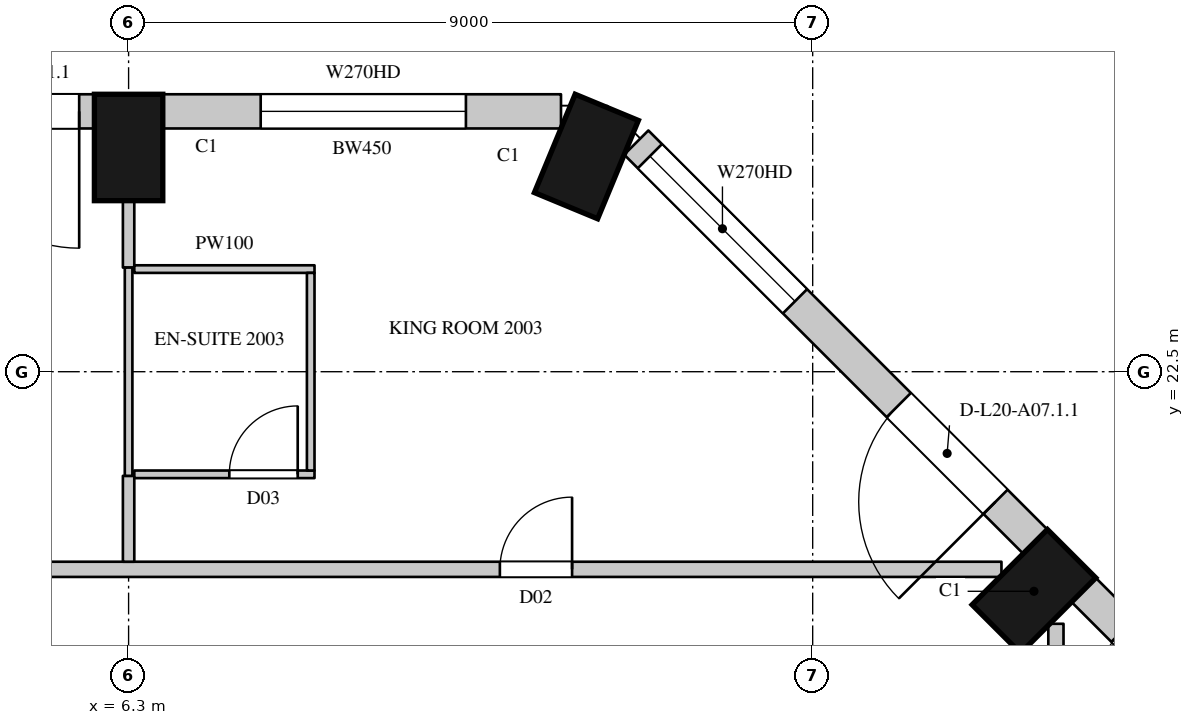
"""IFC4 building model, lengths in metres.
Left out: names, types, materials, properties, quantities, classifications, styles, units other than length and angle.
Written with IfcOpenShell. Run it as: python <this file> out.ifc"""

import sys

from ifc_helpers import new_model, si_unit, direction, frame, frame_2d, origin, origin_2d, place, context, subcontext, project, spatial, rectangle, extrude, element, fill, save


model = new_model("IFC4")
c1 = context("Model", 3, precision=1e-05, world=origin(), true_north=direction((0.0, 1.0)))
c2 = subcontext(c1, "Body", "Model", "MODEL_VIEW")
j1 = project(units=[si_unit("LENGTHUNIT", "METRE"), si_unit("PLANEANGLEUNIT", "RADIAN")], contexts=[c1])
p1 = place(None, origin())
s1 = spatial("IfcSite", under=j1, at=p1, CompositionType="ELEMENT")
p2 = place(p1, origin())
s2 = spatial("IfcBuilding", under=s1, at=p2, CompositionType="ELEMENT")
p3 = place(p2, frame((0.0, 0.0, 102.3)))
s3 = spatial("IfcBuildingStorey", under=s2, at=p3, CompositionType="ELEMENT", Elevation=102.3)
for number, where, z_axis, x_axis in (
    (1, (18.211, 19.611, 0.0), (0.0, 0.0, 1.0), (-0.707, 0.707, 0.0)),
    (2, (12.323, 25.331, 0.0), (0.0, 0.0, 1.0), (-0.924, 0.383, 0.0)),
    (3, (6.3, 25.45, 0.0), (0.0, 0.0, 1.0), (-1.0, 0.0, 0.0)),
):
    element("IfcColumn", number, at=place(p3, frame(where, z_axis=z_axis, x_axis=x_axis)), inside=s3, PredefinedType="COLUMN", context=c2, shape_type="SweptSolid", body=[
        extrude(rectangle(XDim=0.9, YDim=1.4, at=origin_2d()), origin(), (0.0, 0.0, 1.0), 3.6),
    ])
p4 = place(p3, frame((24.115, 14.379, 0.0), z_axis=(0.0, 0.0, 1.0), x_axis=(-0.707106781187, 0.707106781187, 0.0)))
e4 = element("IfcWall", 4, at=p4, inside=s3, PredefinedType="SOLIDWALL", context=c2, shape_type="SweptSolid", body=[
    extrude(rectangle(XDim=7.424, YDim=0.45, at=frame_2d((3.712, 0.0))), origin(), (0.0, 0.0, 1.0), 3.3),
])
p5 = place(p4, frame((0.253, 0.0, 1.05)))
e5 = element("IfcOpeningElement", 5, at=p5, cuts=e4, PredefinedType="OPENING", context=c2, shape_type="SweptSolid", body=[
    extrude(rectangle(XDim=2.7, YDim=2.0, at=frame_2d((1.35, 1.0))), frame((0.0, 0.235, 0.0), z_axis=(0.0, -1.0, 0.0), x_axis=(1.0, 0.0, 0.0)), (0.0, 0.0, 1.0), 0.47),
])
p6 = place(p4, frame((4.884, 0.0, 0.0)))
e6 = element("IfcOpeningElement", 6, at=p6, cuts=e4, PredefinedType="OPENING", context=c2, shape_type="SweptSolid", body=[
    extrude(rectangle(XDim=1.8, YDim=2.4, at=frame_2d((0.9, 1.2))), frame((0.0, 0.235, 0.0), z_axis=(0.0, -1.0, 0.0), x_axis=(1.0, 0.0, 0.0)), (0.0, 0.0, 1.0), 0.47),
])
p7 = place(p3, frame((18.229, 20.265, 0.0), z_axis=(0.0, 0.0, 1.0), x_axis=(-0.707106781187, 0.707106781187, 0.0)))
e7 = element("IfcWall", 7, at=p7, inside=s3, PredefinedType="SOLIDWALL", context=c2, shape_type="SweptSolid", body=[
    extrude(rectangle(XDim=7.424, YDim=0.45, at=frame_2d((3.712, 0.0))), origin(), (0.0, 0.0, 1.0), 3.3),
])
p8 = place(p7, frame((0.74, 0.0, 0.0)))
e8 = element("IfcOpeningElement", 8, at=p8, cuts=e7, PredefinedType="OPENING", context=c2, shape_type="SweptSolid", body=[
    extrude(rectangle(XDim=1.8, YDim=2.4, at=frame_2d((0.9, 1.2))), frame((0.0, 0.235, 0.0), z_axis=(0.0, -1.0, 0.0), x_axis=(1.0, 0.0, 0.0)), (0.0, 0.0, 1.0), 0.47),
])
p9 = place(p7, frame((4.471, 0.0, 1.05)))
e9 = element("IfcOpeningElement", 9, at=p9, cuts=e7, PredefinedType="OPENING", context=c2, shape_type="SweptSolid", body=[
    extrude(rectangle(XDim=2.7, YDim=2.0, at=frame_2d((1.35, 1.0))), frame((0.0, 0.235, 0.0), z_axis=(0.0, -1.0, 0.0), x_axis=(1.0, 0.0, 0.0)), (0.0, 0.0, 1.0), 0.47),
])
p10 = place(p3, frame((11.989, 25.925, 0.0), z_axis=(0.0, 0.0, 1.0), x_axis=(-1.0, 0.0, 0.0)))
e10 = element("IfcWall", 10, at=p10, inside=s3, PredefinedType="SOLIDWALL", context=c2, shape_type="SweptSolid", body=[
    extrude(rectangle(XDim=5.239, YDim=0.45, at=frame_2d((2.619, 0.0))), origin(), (0.0, 0.0, 1.0), 3.3),
])
p11 = place(p10, frame((1.251, 0.0, 1.05)))
e11 = element("IfcOpeningElement", 11, at=p11, cuts=e10, PredefinedType="OPENING", context=c2, shape_type="SweptSolid", body=[
    extrude(rectangle(XDim=2.7, YDim=2.0, at=frame_2d((1.35, 1.0))), frame((0.0, 0.235, 0.0), z_axis=(0.0, -1.0, 0.0), x_axis=(1.0, 0.0, 0.0)), (0.0, 0.0, 1.0), 0.47),
])
p12 = place(p3, frame((5.85, 25.925, 0.0), z_axis=(0.0, 0.0, 1.0), x_axis=(-1.0, 0.0, 0.0)))
e12 = element("IfcWall", 12, at=p12, inside=s3, PredefinedType="SOLIDWALL", context=c2, shape_type="SweptSolid", body=[
    extrude(rectangle(XDim=8.1, YDim=0.45, at=frame_2d((4.05, 0.0))), origin(), (0.0, 0.0, 1.0), 3.3),
])
p13 = place(p12, frame((0.2, 0.0, 0.0)))
e13 = element("IfcOpeningElement", 13, at=p13, cuts=e12, PredefinedType="OPENING", context=c2, shape_type="SweptSolid", body=[
    extrude(rectangle(XDim=1.8, YDim=2.4, at=frame_2d((0.9, 1.2))), frame((0.0, 0.235, 0.0), z_axis=(0.0, -1.0, 0.0), x_axis=(1.0, 0.0, 0.0)), (0.0, 0.0, 1.0), 0.47),
])
p14 = place(p12, frame((2.2, 0.0, 1.05)))
e14 = element("IfcOpeningElement", 14, at=p14, cuts=e12, PredefinedType="OPENING", context=c2, shape_type="SweptSolid", body=[
    extrude(rectangle(XDim=1.2, YDim=2.0, at=frame_2d((0.6, 1.0))), frame((0.0, 0.235, 0.0), z_axis=(0.0, -1.0, 0.0), x_axis=(1.0, 0.0, 0.0)), (0.0, 0.0, 1.0), 0.47),
])
p15 = place(p12, frame((4.7, 0.0, 0.0)))
e15 = element("IfcOpeningElement", 15, at=p15, cuts=e12, PredefinedType="OPENING", context=c2, shape_type="SweptSolid", body=[
    extrude(rectangle(XDim=1.8, YDim=2.4, at=frame_2d((0.9, 1.2))), frame((0.0, 0.235, 0.0), z_axis=(0.0, -1.0, 0.0), x_axis=(1.0, 0.0, 0.0)), (0.0, 0.0, 1.0), 0.47),
])
p16 = place(p12, frame((6.7, 0.0, 1.05)))
e16 = element("IfcOpeningElement", 16, at=p16, cuts=e12, PredefinedType="OPENING", context=c2, shape_type="SweptSolid", body=[
    extrude(rectangle(XDim=1.2, YDim=2.0, at=frame_2d((0.6, 1.0))), frame((0.0, 0.235, 0.0), z_axis=(0.0, -1.0, 0.0), x_axis=(1.0, 0.0, 0.0)), (0.0, 0.0, 1.0), 0.47),
])
p17 = place(p3, frame((19.937, 20.078, 0.0), z_axis=(0.0, 0.0, 1.0), x_axis=(-0.707106781187, 0.707106781187, 0.0)))
e17 = element("IfcWall", 17, at=p17, inside=s3, PredefinedType="SOLIDWALL", context=c2, shape_type="SweptSolid", body=[
    extrude(rectangle(XDim=1.781, YDim=0.45, at=frame_2d((0.89, 0.0))), origin(), (0.0, 0.0, 1.0), 0.6),
])
p18 = place(p3, frame((16.486, 23.529, 0.0), z_axis=(0.0, 0.0, 1.0), x_axis=(-0.707022305137, 0.707191247145, 0.0)))
e18 = element("IfcWall", 18, at=p18, inside=s3, PredefinedType="SOLIDWALL", context=c2, shape_type="SweptSolid", body=[
    extrude(rectangle(XDim=1.445, YDim=0.45, at=frame_2d((0.723, 0.0))), origin(), (0.0, 0.0, 1.0), 0.6),
])
p19 = place(p3, frame((-23.765, 19.9, 0.0), z_axis=(0.0, 0.0, 1.0), x_axis=(1.0, 0.0, 0.0)))
e19 = element("IfcWall", 19, at=p19, inside=s3, PredefinedType="PARTITIONING", context=c2, shape_type="SweptSolid", body=[
    extrude(rectangle(XDim=41.549, YDim=0.2, at=frame_2d((20.774, 0.0))), origin(), (0.0, 0.0, 1.0), 3.3),
])
p20 = place(p19, frame((14.2, 0.0, 0.0)))
e20 = element("IfcOpeningElement", 20, at=p20, cuts=e19, PredefinedType="OPENING", context=c2, shape_type="SweptSolid", body=[
    extrude(rectangle(XDim=0.9, YDim=2.2, at=frame_2d((0.45, 1.1))), frame((0.0, 0.11, 0.0), z_axis=(0.0, -1.0, 0.0), x_axis=(1.0, 0.0, 0.0)), (0.0, 0.0, 1.0), 0.22),
])
p21 = place(p19, frame((27.05, 0.0, 0.0)))
e21 = element("IfcOpeningElement", 21, at=p21, cuts=e19, PredefinedType="OPENING", context=c2, shape_type="SweptSolid", body=[
    extrude(rectangle(XDim=0.9, YDim=2.2, at=frame_2d((0.45, 1.1))), frame((0.0, 0.11, 0.0), z_axis=(0.0, -1.0, 0.0), x_axis=(1.0, 0.0, 0.0)), (0.0, 0.0, 1.0), 0.22),
])
p22 = place(p19, frame((0.75, 0.0, 0.0)))
e22 = element("IfcOpeningElement", 22, at=p22, cuts=e19, PredefinedType="OPENING", context=c2, shape_type="SweptSolid", body=[
    extrude(rectangle(XDim=1.1, YDim=2.4, at=frame_2d((0.55, 1.2))), frame((0.0, 0.11, 0.0), z_axis=(0.0, -1.0, 0.0), x_axis=(1.0, 0.0, 0.0)), (0.0, 0.0, 1.0), 0.22),
])
p23 = place(p19, frame((23.15, 0.0, 0.0)))
e23 = element("IfcOpeningElement", 23, at=p23, cuts=e19, PredefinedType="OPENING", context=c2, shape_type="SweptSolid", body=[
    extrude(rectangle(XDim=0.95, YDim=2.2, at=frame_2d((0.475, 1.1))), frame((0.0, 0.11, 0.0), z_axis=(0.0, -1.0, 0.0), x_axis=(1.0, 0.0, 0.0)), (0.0, 0.0, 1.0), 0.22),
])
p24 = place(p19, frame((34.95, 0.0, 0.0)))
e24 = element("IfcOpeningElement", 24, at=p24, cuts=e19, PredefinedType="OPENING", context=c2, shape_type="SweptSolid", body=[
    extrude(rectangle(XDim=0.95, YDim=2.2, at=frame_2d((0.475, 1.1))), frame((0.0, 0.11, 0.0), z_axis=(0.0, -1.0, 0.0), x_axis=(1.0, 0.0, 0.0)), (0.0, 0.0, 1.0), 0.22),
])
p25 = place(p3, frame((18.5, 4.75, 0.0), z_axis=(0.0, 0.0, 1.0), x_axis=(0.0, 1.0, 0.0)))
e25 = element("IfcWall", 25, at=p25, inside=s3, PredefinedType="PARTITIONING", context=c2, shape_type="SweptSolid", body=[
    extrude(rectangle(XDim=14.434, YDim=0.2, at=frame_2d((7.217, 0.0))), origin(), (0.0, 0.0, 1.0), 3.3),
])
p26 = place(p25, frame((7.65, 0.0, 0.0)))
e26 = element("IfcOpeningElement", 26, at=p26, cuts=e25, PredefinedType="OPENING", context=c2, shape_type="SweptSolid", body=[
    extrude(rectangle(XDim=0.95, YDim=2.2, at=frame_2d((0.475, 1.1))), frame((0.0, 0.11, 0.0), z_axis=(0.0, -1.0, 0.0), x_axis=(1.0, 0.0, 0.0)), (0.0, 0.0, 1.0), 0.22),
])
p27 = place(p3, frame((6.3, 20.0, 0.0), z_axis=(0.0, 0.0, 1.0), x_axis=(0.0, 1.0, 0.0)))
e27 = element("IfcWall", 27, at=p27, inside=s3, PredefinedType="PARTITIONING", context=c2, shape_type="SweptSolid", body=[
    extrude(rectangle(XDim=1.13, YDim=0.15, at=frame_2d((0.565, 0.0))), origin(), (0.0, 0.0, 1.0), 2.75),
])
p28 = place(p3, frame((6.3, 23.87, 0.0), z_axis=(0.0, 0.0, 1.0), x_axis=(0.0, 1.0, 0.0)))
e28 = element("IfcWall", 28, at=p28, inside=s3, PredefinedType="PARTITIONING", context=c2, shape_type="SweptSolid", body=[
    extrude(rectangle(XDim=0.88, YDim=0.15, at=frame_2d((0.44, 0.0))), origin(), (0.0, 0.0, 1.0), 2.75),
])
p29 = place(p3, frame((6.3, 21.13, 0.0), z_axis=(0.0, 0.0, 1.0), x_axis=(0.0, 1.0, 0.0)))
e29 = element("IfcWall", 29, at=p29, inside=s3, PredefinedType="PARTITIONING", context=c2, shape_type="SweptSolid", body=[
    extrude(rectangle(XDim=2.74, YDim=0.1, at=frame_2d((1.37, 0.0))), origin(), (0.0, 0.0, 1.0), 2.75),
])
p30 = place(p3, frame((6.375, 21.15, 0.0), z_axis=(0.0, 0.0, 1.0), x_axis=(1.0, 0.0, 0.0)))
e30 = element("IfcWall", 30, at=p30, inside=s3, PredefinedType="PARTITIONING", context=c2, shape_type="SweptSolid", body=[
    extrude(rectangle(XDim=2.371, YDim=0.1, at=frame_2d((1.186, 0.0))), origin(), (0.0, 0.0, 1.0), 3.3),
])
p31 = place(p30, frame((1.25, 0.0, 0.0)))
e31 = element("IfcOpeningElement", 31, at=p31, cuts=e30, PredefinedType="OPENING", context=c2, shape_type="SweptSolid", body=[
    extrude(rectangle(XDim=0.9, YDim=2.2, at=frame_2d((0.45, 1.1))), frame((0.0, 0.06, 0.0), z_axis=(0.0, -1.0, 0.0), x_axis=(1.0, 0.0, 0.0)), (0.0, 0.0, 1.0), 0.12),
])
p32 = place(p3, frame((6.375, 23.85, 0.0), z_axis=(0.0, 0.0, 1.0), x_axis=(1.0, 0.0, 0.0)))
e32 = element("IfcWall", 32, at=p32, inside=s3, PredefinedType="PARTITIONING", context=c2, shape_type="SweptSolid", body=[
    extrude(rectangle(XDim=2.371, YDim=0.1, at=frame_2d((1.186, 0.0))), origin(), (0.0, 0.0, 1.0), 3.3),
])
p33 = place(p3, frame((8.696, 21.2, 0.0), z_axis=(0.0, 0.0, 1.0), x_axis=(0.0, 1.0, 0.0)))
e33 = element("IfcWall", 33, at=p33, inside=s3, PredefinedType="PARTITIONING", context=c2, shape_type="SweptSolid", body=[
    extrude(rectangle(XDim=2.6, YDim=0.1, at=frame_2d((1.3, 0.0))), origin(), (0.0, 0.0, 1.0), 3.3),
])
p34 = place(p8, origin())
e34 = element("IfcDoor", 34, at=p34, inside=s3, OperationType="SLIDING_TO_LEFT", PredefinedType="DOOR", context=c2, shape_type="SweptSolid", body=[
    extrude(rectangle(XDim=1.8, YDim=2.4, at=frame_2d((0.9, 1.2))), frame((0.0, 0.13, 0.0), z_axis=(0.0, -1.0, 0.0), x_axis=(1.0, 0.0, 0.0)), (0.0, 0.0, 1.0), 0.05),
])
fill(e8, e34)
p35 = place(p9, origin())
e35 = element("IfcWindow", 35, at=p35, inside=s3, PartitioningType="SINGLE_PANEL", PredefinedType="WINDOW", context=c2, shape_type="SweptSolid", body=[
    extrude(rectangle(XDim=2.7, YDim=2.0, at=frame_2d((1.35, 1.0))), frame((0.0, 0.135, 0.0), z_axis=(0.0, -1.0, 0.0), x_axis=(1.0, 0.0, 0.0)), (0.0, 0.0, 1.0), 0.06),
])
fill(e9, e35)
p36 = place(p11, origin())
e36 = element("IfcWindow", 36, at=p36, inside=s3, PartitioningType="SINGLE_PANEL", PredefinedType="WINDOW", context=c2, shape_type="SweptSolid", body=[
    extrude(rectangle(XDim=2.7, YDim=2.0, at=frame_2d((1.35, 1.0))), frame((0.0, 0.135, 0.0), z_axis=(0.0, -1.0, 0.0), x_axis=(1.0, 0.0, 0.0)), (0.0, 0.0, 1.0), 0.06),
])
fill(e11, e36)
p37 = place(p13, origin())
e37 = element("IfcDoor", 37, at=p37, inside=s3, OperationType="SLIDING_TO_LEFT", PredefinedType="DOOR", context=c2, shape_type="SweptSolid", body=[
    extrude(rectangle(XDim=1.8, YDim=2.4, at=frame_2d((0.9, 1.2))), frame((0.0, 0.13, 0.0), z_axis=(0.0, -1.0, 0.0), x_axis=(1.0, 0.0, 0.0)), (0.0, 0.0, 1.0), 0.05),
])
fill(e13, e37)
p38 = place(p24, origin())
e38 = element("IfcDoor", 38, at=p38, inside=s3, OperationType="SINGLE_SWING_RIGHT", PredefinedType="DOOR", context=c2, shape_type="SweptSolid", body=[
    extrude(rectangle(XDim=0.95, YDim=2.2, at=frame_2d((0.475, 1.1))), frame((0.0, 0.025, 0.0), z_axis=(0.0, -1.0, 0.0), x_axis=(1.0, 0.0, 0.0)), (0.0, 0.0, 1.0), 0.05),
])
fill(e24, e38)
p39 = place(p31, origin())
e39 = element("IfcDoor", 39, at=p39, inside=s3, OperationType="SINGLE_SWING_RIGHT", PredefinedType="DOOR", context=c2, shape_type="SweptSolid", body=[
    extrude(rectangle(XDim=0.9, YDim=2.2, at=frame_2d((0.45, 1.1))), frame((0.0, 0.025, 0.0), z_axis=(0.0, -1.0, 0.0), x_axis=(1.0, 0.0, 0.0)), (0.0, 0.0, 1.0), 0.05),
])
fill(e31, e39)
save(model, sys.argv[1])
